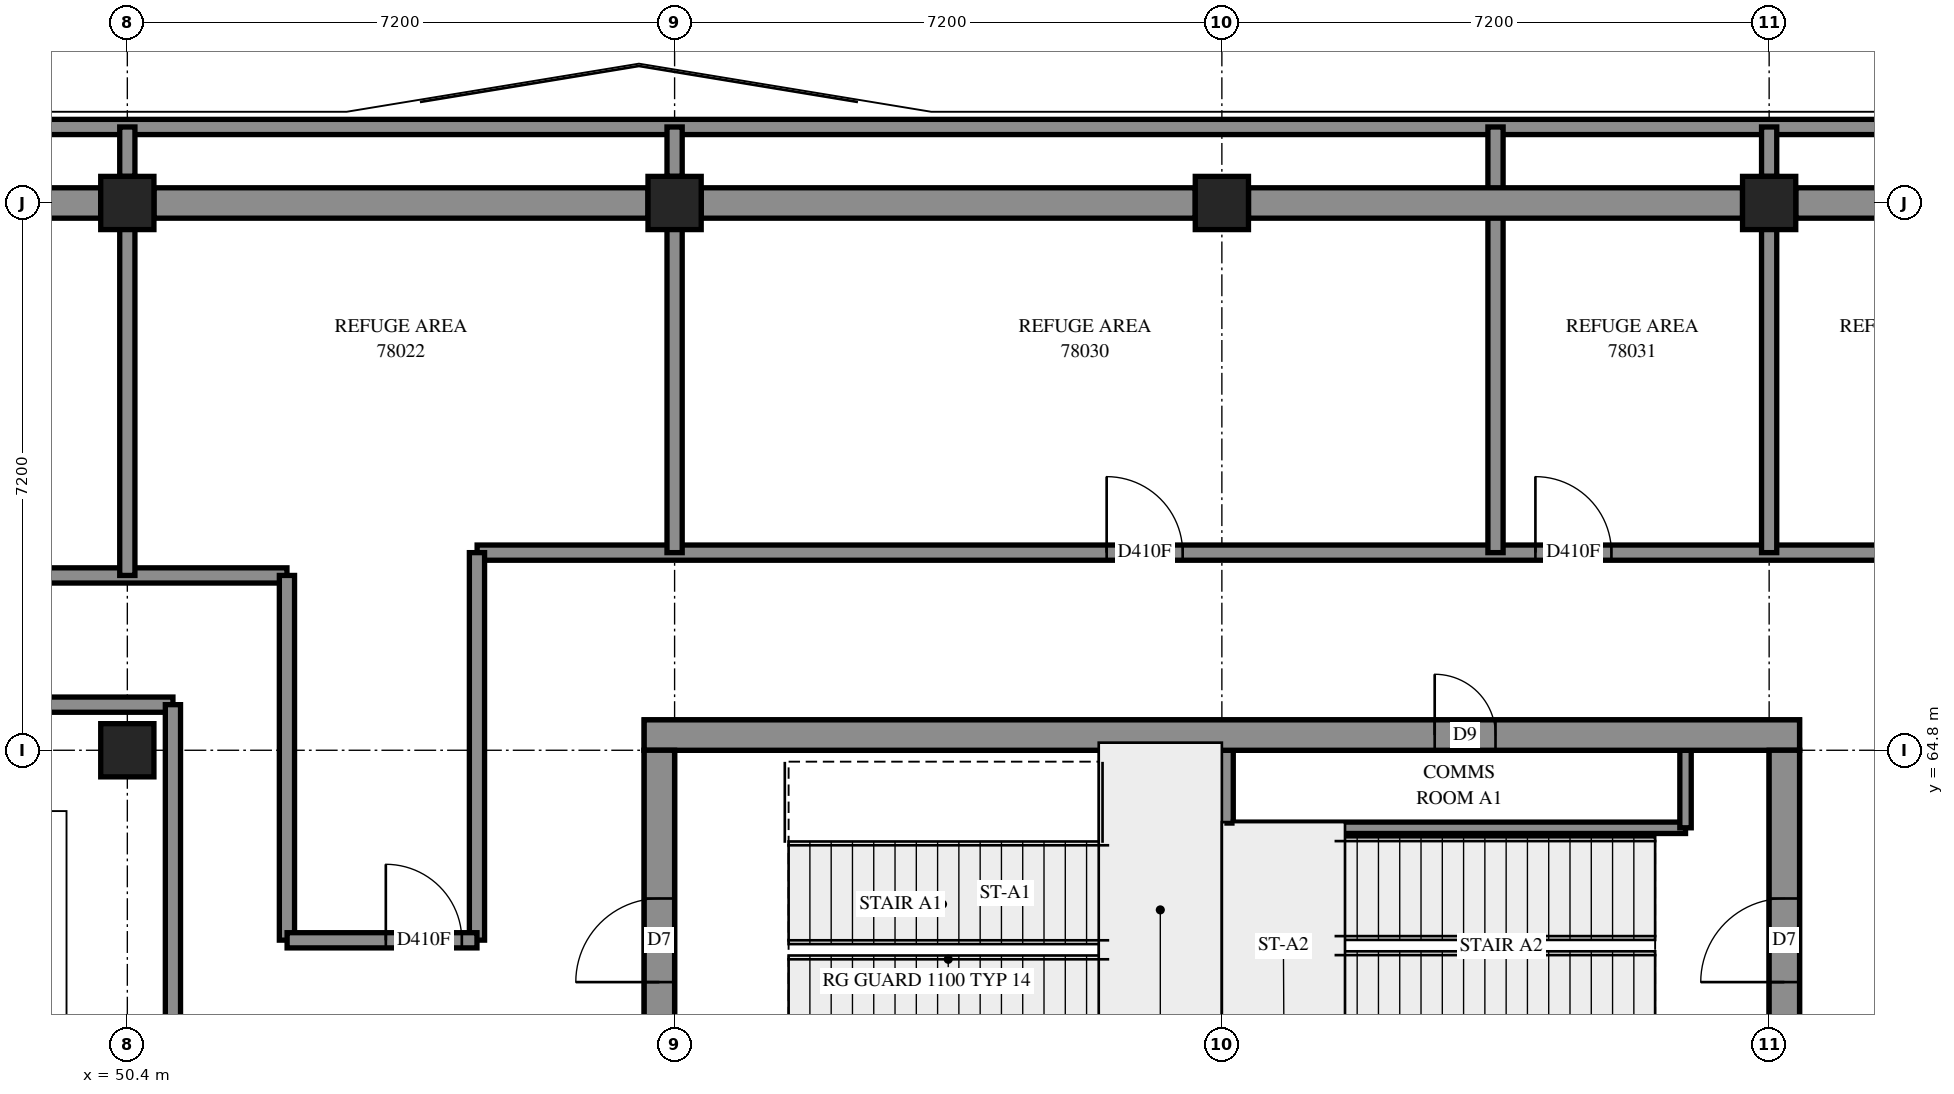
"""IFC4 building model, lengths in metres.
Left out: names, types, materials, properties, quantities, classifications, styles, units other than length and angle.
Written with IfcOpenShell. Run it as: python <this file> out.ifc"""

import sys

from ifc_helpers import new_model, si_unit, direction, frame, frame_2d, origin, origin_2d, place, context, subcontext, project, spatial, rectangle, extrude, element, fill, save


model = new_model("IFC4")
c1 = context("Model", 3, precision=1e-05, world=origin(), true_north=direction((0.0, 1.0)))
c2 = subcontext(c1, "Body", "Model", "MODEL_VIEW")
j1 = project(units=[si_unit("LENGTHUNIT", "METRE"), si_unit("PLANEANGLEUNIT", "RADIAN")], contexts=[c1])
p1 = place(None, origin())
s1 = spatial("IfcSite", under=j1, at=p1, CompositionType="ELEMENT")
p2 = place(p1, origin())
s2 = spatial("IfcBuilding", under=s1, at=p2, CompositionType="ELEMENT")
p3 = place(p2, frame((0.0, 0.0, 284.6)))
s3 = spatial("IfcBuildingStorey", under=s2, at=p3, CompositionType="ELEMENT", Elevation=284.6)
for number, where, z_axis, x_axis in (
    (1, (50.4, 64.8, 0.0), (0.0, 0.0, 1.0), (1.0, 0.0, 0.0)),
    (2, (50.4, 72.0, 0.0), (0.0, 0.0, 1.0), (1.0, 0.0, 0.0)),
    (3, (57.6, 72.0, 0.0), (0.0, 0.0, 1.0), (1.0, 0.0, 0.0)),
    (4, (64.8, 72.0, 0.0), (0.0, 0.0, 1.0), (1.0, 0.0, 0.0)),
    (5, (72.0, 72.0, 0.0), (0.0, 0.0, 1.0), (1.0, 0.0, 0.0)),
):
    element("IfcColumn", number, at=place(p3, frame(where, z_axis=z_axis, x_axis=x_axis)), inside=s3, PredefinedType="COLUMN", context=c2, shape_type="SweptSolid", body=[
        extrude(rectangle(XDim=0.7, YDim=0.7, at=origin_2d()), origin(), (0.0, 0.0, 1.0), 5.7),
    ])
p4 = place(p3, frame((57.2, 65.0, -0.3), z_axis=(0.0, 0.0, 1.0), x_axis=(1.0, 0.0, 0.0)))
e6 = element("IfcWall", 6, at=p4, inside=s3, PredefinedType="SHEAR", context=c2, shape_type="SweptSolid", body=[
    extrude(rectangle(XDim=15.2, YDim=0.4, at=frame_2d((7.6, 0.0))), origin(), (0.0, 0.0, 1.0), 5.3),
])
p5 = place(p4, frame((10.4, 0.0, 0.3)))
e7 = element("IfcOpeningElement", 7, at=p5, cuts=e6, PredefinedType="OPENING", context=c2, shape_type="SweptSolid", body=[
    extrude(rectangle(XDim=0.8, YDim=2.1, at=frame_2d((0.4, 1.05))), frame((0.0, 0.21, 0.0), z_axis=(0.0, -1.0, 0.0), x_axis=(1.0, 0.0, 0.0)), (0.0, 0.0, 1.0), 0.42),
])
p6 = place(p3, frame((57.4, 50.4, -0.3), z_axis=(0.0, 0.0, 1.0), x_axis=(0.0, 1.0, 0.0)))
e8 = element("IfcWall", 8, at=p6, inside=s3, PredefinedType="SHEAR", context=c2, shape_type="SweptSolid", body=[
    extrude(rectangle(XDim=14.4, YDim=0.4, at=frame_2d((7.2, 0.0))), origin(), (0.0, 0.0, 1.0), 5.3),
])
p7 = place(p6, frame((4.55, 0.0, 0.3)))
e9 = element("IfcOpeningElement", 9, at=p7, cuts=e8, PredefinedType="OPENING", context=c2, shape_type="SweptSolid", body=[
    extrude(rectangle(XDim=1.1, YDim=2.1, at=frame_2d((0.55, 1.05))), frame((0.0, 0.21, 0.0), z_axis=(0.0, -1.0, 0.0), x_axis=(1.0, 0.0, 0.0)), (0.0, 0.0, 1.0), 0.42),
])
p8 = place(p6, frame((11.35, 0.0, 0.3)))
e10 = element("IfcOpeningElement", 10, at=p8, cuts=e8, PredefinedType="OPENING", context=c2, shape_type="SweptSolid", body=[
    extrude(rectangle(XDim=1.1, YDim=2.1, at=frame_2d((0.55, 1.05))), frame((0.0, 0.21, 0.0), z_axis=(0.0, -1.0, 0.0), x_axis=(1.0, 0.0, 0.0)), (0.0, 0.0, 1.0), 0.42),
])
p9 = place(p3, frame((72.2, 50.4, -0.3), z_axis=(0.0, 0.0, 1.0), x_axis=(0.0, 1.0, 0.0)))
e11 = element("IfcWall", 11, at=p9, inside=s3, PredefinedType="SHEAR", context=c2, shape_type="SweptSolid", body=[
    extrude(rectangle(XDim=14.4, YDim=0.4, at=frame_2d((7.2, 0.0))), origin(), (0.0, 0.0, 1.0), 5.3),
])
p10 = place(p9, frame((4.55, 0.0, 0.3)))
e12 = element("IfcOpeningElement", 12, at=p10, cuts=e11, PredefinedType="OPENING", context=c2, shape_type="SweptSolid", body=[
    extrude(rectangle(XDim=1.1, YDim=2.1, at=frame_2d((0.55, 1.05))), frame((0.0, 0.21, 0.0), z_axis=(0.0, -1.0, 0.0), x_axis=(1.0, 0.0, 0.0)), (0.0, 0.0, 1.0), 0.42),
])
p11 = place(p9, frame((11.35, 0.0, 0.3)))
e13 = element("IfcOpeningElement", 13, at=p11, cuts=e11, PredefinedType="OPENING", context=c2, shape_type="SweptSolid", body=[
    extrude(rectangle(XDim=1.1, YDim=2.1, at=frame_2d((0.55, 1.05))), frame((0.0, 0.21, 0.0), z_axis=(0.0, -1.0, 0.0), x_axis=(1.0, 0.0, 0.0)), (0.0, 0.0, 1.0), 0.42),
])
p12 = place(p3, frame((64.8, 60.6, 0.0), z_axis=(0.0, 0.0, 1.0), x_axis=(0.0, 1.0, 0.0)))
e14 = element("IfcWall", 14, at=p12, inside=s3, PredefinedType="SOLIDWALL", context=c2, shape_type="SweptSolid", body=[
    extrude(rectangle(XDim=4.2, YDim=0.3, at=frame_2d((2.1, 0.0))), origin(), (0.0, 0.0, 1.0), 5.7),
])
p13 = place(p3, frame((64.95, 63.78, 0.0), z_axis=(0.0, 0.0, 1.0), x_axis=(1.0, 0.0, 0.0)))
e15 = element("IfcWall", 15, at=p13, inside=s3, PredefinedType="PARTITIONING", context=c2, shape_type="SweptSolid", body=[
    extrude(rectangle(XDim=5.95, YDim=0.15, at=frame_2d((2.975, 0.0))), origin(), (0.0, 0.0, 1.0), 5.7),
])
p14 = place(p3, frame((70.9, 63.78, 0.0), z_axis=(0.0, 0.0, 1.0), x_axis=(0.0, 1.0, 0.0)))
e16 = element("IfcWall", 16, at=p14, inside=s3, PredefinedType="PARTITIONING", context=c2, shape_type="SweptSolid", body=[
    extrude(rectangle(XDim=1.02, YDim=0.15, at=frame_2d((0.51, 0.0))), origin(), (0.0, 0.0, 1.0), 5.7),
])
p15 = place(p3, frame((27.73, 73.0, 0.0), z_axis=(0.0, 0.0, 1.0), x_axis=(1.0, 0.0, 0.0)))
e17 = element("IfcWall", 17, at=p15, inside=s3, PredefinedType="PARTITIONING", context=c2, shape_type="SweptSolid", body=[
    extrude(rectangle(XDim=51.47, YDim=0.2, at=frame_2d((25.735, 0.0))), origin(), (0.0, 0.0, 1.0), 5.2),
])
p16 = place(p3, frame((28.8, 67.1, 0.0), z_axis=(0.0, 0.0, 1.0), x_axis=(1.0, 0.0, 0.0)))
e18 = element("IfcWall", 18, at=p16, inside=s3, PredefinedType="PARTITIONING", context=c2, shape_type="SweptSolid", body=[
    extrude(rectangle(XDim=23.7, YDim=0.2, at=frame_2d((11.85, 0.0))), origin(), (0.0, 0.0, 1.0), 5.7),
])
p17 = place(p16, frame((5.684, 0.0, 0.0)))
e19 = element("IfcOpeningElement", 19, at=p17, cuts=e18, PredefinedType="OPENING", context=c2, shape_type="SweptSolid", body=[
    extrude(rectangle(XDim=1.0, YDim=2.1, at=frame_2d((0.5, 1.05))), frame((0.0, 0.11, 0.0), z_axis=(0.0, -1.0, 0.0), x_axis=(1.0, 0.0, 0.0)), (0.0, 0.0, 1.0), 0.22),
])
p18 = place(p16, frame((11.307, 0.0, 0.0)))
e20 = element("IfcOpeningElement", 20, at=p18, cuts=e18, PredefinedType="OPENING", context=c2, shape_type="SweptSolid", body=[
    extrude(rectangle(XDim=1.0, YDim=2.1, at=frame_2d((0.5, 1.05))), frame((0.0, 0.11, 0.0), z_axis=(0.0, -1.0, 0.0), x_axis=(1.0, 0.0, 0.0)), (0.0, 0.0, 1.0), 0.22),
])
p19 = place(p16, frame((18.262, 0.0, 0.0)))
e21 = element("IfcOpeningElement", 21, at=p19, cuts=e18, PredefinedType="OPENING", context=c2, shape_type="SweptSolid", body=[
    extrude(rectangle(XDim=1.0, YDim=2.1, at=frame_2d((0.5, 1.05))), frame((0.0, 0.11, 0.0), z_axis=(0.0, -1.0, 0.0), x_axis=(1.0, 0.0, 0.0)), (0.0, 0.0, 1.0), 0.22),
])
p20 = place(p3, frame((55.002, 67.4, 0.0), z_axis=(0.0, 0.0, 1.0), x_axis=(1.0, 0.0, 0.0)))
e22 = element("IfcWall", 22, at=p20, inside=s3, PredefinedType="PARTITIONING", context=c2, shape_type="SweptSolid", body=[
    extrude(rectangle(XDim=19.598, YDim=0.2, at=frame_2d((9.799, 0.0))), origin(), (0.0, 0.0, 1.0), 5.7),
])
p21 = place(p20, frame((8.282, 0.0, 0.0)))
e23 = element("IfcOpeningElement", 23, at=p21, cuts=e22, PredefinedType="OPENING", context=c2, shape_type="SweptSolid", body=[
    extrude(rectangle(XDim=1.0, YDim=2.1, at=frame_2d((0.5, 1.05))), frame((0.0, 0.11, 0.0), z_axis=(0.0, -1.0, 0.0), x_axis=(1.0, 0.0, 0.0)), (0.0, 0.0, 1.0), 0.22),
])
p22 = place(p20, frame((13.923, 0.0, 0.0)))
e24 = element("IfcOpeningElement", 24, at=p22, cuts=e22, PredefinedType="OPENING", context=c2, shape_type="SweptSolid", body=[
    extrude(rectangle(XDim=1.0, YDim=2.1, at=frame_2d((0.5, 1.05))), frame((0.0, 0.11, 0.0), z_axis=(0.0, -1.0, 0.0), x_axis=(1.0, 0.0, 0.0)), (0.0, 0.0, 1.0), 0.22),
])
p23 = place(p3, frame((42.602, 65.4, 0.0), z_axis=(0.0, 0.0, 1.0), x_axis=(1.0, 0.0, 0.0)))
e25 = element("IfcWall", 25, at=p23, inside=s3, PredefinedType="PARTITIONING", context=c2, shape_type="SweptSolid", body=[
    extrude(rectangle(XDim=8.398, YDim=0.2, at=frame_2d((4.199, 0.0))), origin(), (0.0, 0.0, 1.0), 5.7),
])
p24 = place(p23, frame((4.526, 0.0, 0.0)))
e26 = element("IfcOpeningElement", 26, at=p24, cuts=e25, PredefinedType="OPENING", context=c2, shape_type="SweptSolid", body=[
    extrude(rectangle(XDim=1.0, YDim=2.1, at=frame_2d((0.5, 1.05))), frame((0.0, 0.11, 0.0), z_axis=(0.0, -1.0, 0.0), x_axis=(1.0, 0.0, 0.0)), (0.0, 0.0, 1.0), 0.22),
])
p25 = place(p3, frame((68.4, 67.4, 0.0), z_axis=(0.0, 0.0, 1.0), x_axis=(0.0, 1.0, 0.0)))
e27 = element("IfcWall", 27, at=p25, inside=s3, PredefinedType="PARTITIONING", context=c2, shape_type="SweptSolid", body=[
    extrude(rectangle(XDim=5.6, YDim=0.2, at=frame_2d((2.8, 0.0))), origin(), (0.0, 0.0, 1.0), 5.7),
])
p26 = place(p3, frame((51.0, 60.1, 0.0), z_axis=(0.0, 0.0, 1.0), x_axis=(0.0, 1.0, 0.0)))
e28 = element("IfcWall", 28, at=p26, inside=s3, PredefinedType="PARTITIONING", context=c2, shape_type="SweptSolid", body=[
    extrude(rectangle(XDim=5.3, YDim=0.2, at=frame_2d((2.65, 0.0))), origin(), (0.0, 0.0, 1.0), 5.7),
])
p27 = place(p3, frame((55.0, 62.302, 0.0), z_axis=(0.0, 0.0, 1.0), x_axis=(0.0, 1.0, 0.0)))
e29 = element("IfcWall", 29, at=p27, inside=s3, PredefinedType="PARTITIONING", context=c2, shape_type="SweptSolid", body=[
    extrude(rectangle(XDim=5.098, YDim=0.2, at=frame_2d((2.549, 0.0))), origin(), (0.0, 0.0, 1.0), 5.7),
])
p28 = place(p3, frame((52.5, 62.302, 0.0), z_axis=(0.0, 0.0, 1.0), x_axis=(0.0, 1.0, 0.0)))
e30 = element("IfcWall", 30, at=p28, inside=s3, PredefinedType="PARTITIONING", context=c2, shape_type="SweptSolid", body=[
    extrude(rectangle(XDim=4.798, YDim=0.2, at=frame_2d((2.399, 0.0))), origin(), (0.0, 0.0, 1.0), 5.7),
])
p29 = place(p3, frame((50.4, 67.1, 0.0), z_axis=(0.0, 0.0, 1.0), x_axis=(0.0, 1.0, 0.0)))
e31 = element("IfcWall", 31, at=p29, inside=s3, PredefinedType="PARTITIONING", context=c2, shape_type="SweptSolid", body=[
    extrude(rectangle(XDim=5.25, YDim=0.2, at=frame_2d((2.625, 0.0))), origin(), (0.0, 0.0, 1.0), 5.7),
])
for number, where, z_axis, x_axis in (
    (32, (57.6, 67.4, 0.0), (0.0, 0.0, 1.0), (0.0, 1.0, 0.0)),
    (33, (72.0, 67.4, 0.0), (0.0, 0.0, 1.0), (0.0, 1.0, 0.0)),
):
    element("IfcWall", number, at=place(p3, frame(where, z_axis=z_axis, x_axis=x_axis)), inside=s3, PredefinedType="PARTITIONING", context=c2, shape_type="SweptSolid", body=[
        extrude(rectangle(XDim=4.95, YDim=0.2, at=frame_2d((2.475, 0.0))), origin(), (0.0, 0.0, 1.0), 5.7),
    ])
p30 = place(p3, frame((52.502, 62.3, 0.0), z_axis=(0.0, 0.0, 1.0), x_axis=(1.0, 0.0, 0.0)))
e34 = element("IfcWall", 34, at=p30, inside=s3, PredefinedType="PARTITIONING", context=c2, shape_type="SweptSolid", body=[
    extrude(rectangle(XDim=2.498, YDim=0.2, at=frame_2d((1.249, 0.0))), origin(), (0.0, 0.0, 1.0), 5.7),
])
p31 = place(p30, frame((1.299, 0.0, 0.0)))
e35 = element("IfcOpeningElement", 35, at=p31, cuts=e34, PredefinedType="OPENING", context=c2, shape_type="SweptSolid", body=[
    extrude(rectangle(XDim=1.0, YDim=2.1, at=frame_2d((0.5, 1.05))), frame((0.0, 0.11, 0.0), z_axis=(0.0, -1.0, 0.0), x_axis=(1.0, 0.0, 0.0)), (0.0, 0.0, 1.0), 0.22),
])
for number, where, z_axis, x_axis in (
    (36, (50.4, 72.35, 0.0), (0.0, 0.0, 1.0), (0.0, 1.0, 0.0)),
    (37, (57.6, 72.35, 0.0), (0.0, 0.0, 1.0), (0.0, 1.0, 0.0)),
    (38, (72.0, 72.35, 0.0), (0.0, 0.0, 1.0), (0.0, 1.0, 0.0)),
):
    element("IfcWall", number, at=place(p3, frame(where, z_axis=z_axis, x_axis=x_axis)), inside=s3, PredefinedType="PARTITIONING", context=c2, shape_type="SweptSolid", body=[
        extrude(rectangle(XDim=0.65, YDim=0.2, at=frame_2d((0.325, 0.0))), origin(), (0.0, 0.0, 1.0), 5.7),
    ])
p32 = place(p5, origin())
e39 = element("IfcDoor", 39, at=p32, inside=s3, OperationType="SINGLE_SWING_RIGHT", PredefinedType="DOOR", context=c2, shape_type="SweptSolid", body=[
    extrude(rectangle(XDim=0.8, YDim=2.1, at=frame_2d((0.4, 1.05))), frame((0.0, 0.025, 0.0), z_axis=(0.0, -1.0, 0.0), x_axis=(1.0, 0.0, 0.0)), (0.0, 0.0, 1.0), 0.05),
])
fill(e7, e39)
p33 = place(p8, origin())
e40 = element("IfcDoor", 40, at=p33, inside=s3, OperationType="SINGLE_SWING_LEFT", PredefinedType="DOOR", context=c2, shape_type="SweptSolid", body=[
    extrude(rectangle(XDim=1.1, YDim=2.1, at=frame_2d((0.55, 1.05))), frame((0.0, 0.025, 0.0), z_axis=(0.0, -1.0, 0.0), x_axis=(1.0, 0.0, 0.0)), (0.0, 0.0, 1.0), 0.05),
])
fill(e10, e40)
p34 = place(p11, origin())
e41 = element("IfcDoor", 41, at=p34, inside=s3, OperationType="SINGLE_SWING_RIGHT", PredefinedType="DOOR", context=c2, shape_type="SweptSolid", body=[
    extrude(rectangle(XDim=1.1, YDim=2.1, at=frame_2d((0.55, 1.05))), frame((0.0, 0.025, 0.0), z_axis=(0.0, -1.0, 0.0), x_axis=(1.0, 0.0, 0.0)), (0.0, 0.0, 1.0), 0.05),
])
fill(e13, e41)
p35 = place(p31, origin())
e42 = element("IfcDoor", 42, at=p35, inside=s3, OperationType="SINGLE_SWING_RIGHT", PredefinedType="DOOR", context=c2, shape_type="SweptSolid", body=[
    extrude(rectangle(XDim=1.0, YDim=2.1, at=frame_2d((0.5, 1.05))), frame((0.0, 0.025, 0.0), z_axis=(0.0, -1.0, 0.0), x_axis=(1.0, 0.0, 0.0)), (0.0, 0.0, 1.0), 0.05),
])
fill(e35, e42)
p36 = place(p21, origin())
e43 = element("IfcDoor", 43, at=p36, inside=s3, OperationType="SINGLE_SWING_RIGHT", PredefinedType="DOOR", context=c2, shape_type="SweptSolid", body=[
    extrude(rectangle(XDim=1.0, YDim=2.1, at=frame_2d((0.5, 1.05))), frame((0.0, 0.025, 0.0), z_axis=(0.0, -1.0, 0.0), x_axis=(1.0, 0.0, 0.0)), (0.0, 0.0, 1.0), 0.05),
])
fill(e23, e43)
p37 = place(p22, origin())
e44 = element("IfcDoor", 44, at=p37, inside=s3, OperationType="SINGLE_SWING_LEFT", PredefinedType="DOOR", context=c2, shape_type="SweptSolid", body=[
    extrude(rectangle(XDim=1.0, YDim=2.1, at=frame_2d((0.5, 1.05))), frame((0.0, 0.025, 0.0), z_axis=(0.0, -1.0, 0.0), x_axis=(1.0, 0.0, 0.0)), (0.0, 0.0, 1.0), 0.05),
])
fill(e24, e44)
save(model, sys.argv[1])
